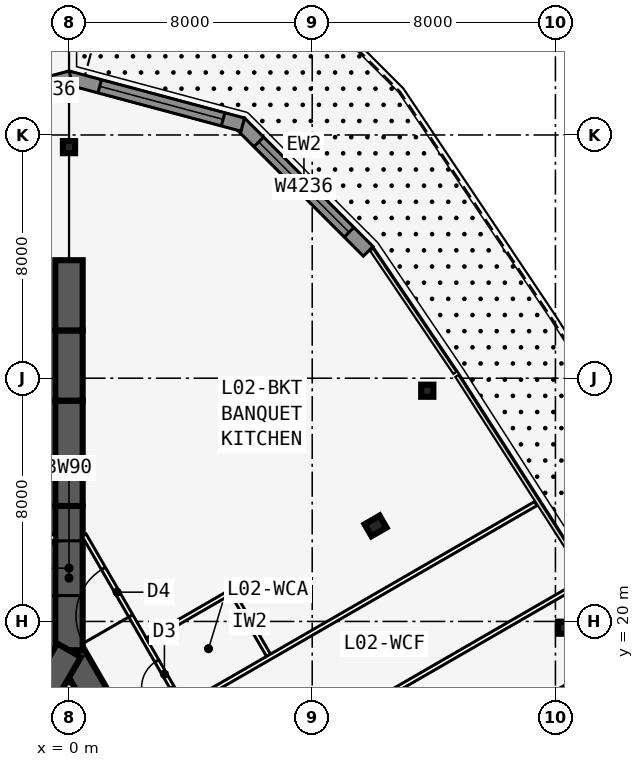
"""IFC4 building model, lengths in metres.
Left out: names, types, materials, properties, quantities, classifications, styles, units other than length and angle.
Written with IfcOpenShell. Run it as: python <this file> out.ifc"""

import sys

from ifc_helpers import new_model, si_unit, direction, frame, frame_2d, origin, origin_2d, place, context, subcontext, project, spatial, rectangle, i_section, extrude, element, fill, save


model = new_model("IFC4")
c1 = context("Model", 3, precision=1e-05, world=origin(), true_north=direction((0.0, 1.0)))
c2 = subcontext(c1, "Body", "Model", "MODEL_VIEW")
j1 = project(units=[si_unit("LENGTHUNIT", "METRE"), si_unit("PLANEANGLEUNIT", "RADIAN")], contexts=[c1])
p1 = place(None, origin())
s1 = spatial("IfcSite", under=j1, at=p1, CompositionType="ELEMENT")
p2 = place(p1, origin())
s2 = spatial("IfcBuilding", under=s1, at=p2, CompositionType="ELEMENT")
p3 = place(p2, frame((0.0, 0.0, 11.0)))
s3 = spatial("IfcBuildingStorey", under=s2, at=p3, CompositionType="ELEMENT", Elevation=11.0)
p4 = place(p3, frame((16.5, -9.526, 0.0), z_axis=(0.0, 0.0, 1.0), x_axis=(-0.499999749417, 0.866025548458, 0.0)))
e1 = element("IfcWall", 1, at=p4, inside=s3, PredefinedType="SHEAR", context=c2, shape_type="SweptSolid", body=[
    extrude(rectangle(XDim=33.0, YDim=0.9, at=frame_2d((16.5, 0.0))), origin(), (0.0, 0.0, 1.0), 6.5),
])
p5 = place(p4, frame((14.15, 0.0, 0.0)))
e2 = element("IfcOpeningElement", 2, at=p5, cuts=e1, PredefinedType="OPENING", context=c2, shape_type="SweptSolid", body=[
    extrude(rectangle(XDim=1.8, YDim=2.13, at=frame_2d((0.9, 1.065))), frame((0.0, 0.46, 0.0), z_axis=(0.0, -1.0, 0.0), x_axis=(1.0, 0.0, 0.0)), (0.0, 0.0, 1.0), 0.92),
])
p6 = place(p4, frame((12.6, 0.0, 0.0)))
e3 = element("IfcOpeningElement", 3, at=p6, cuts=e1, PredefinedType="OPENING", context=c2, shape_type="SweptSolid", body=[
    extrude(rectangle(XDim=1.0, YDim=2.13, at=frame_2d((0.5, 1.065))), frame((0.0, 0.46, 0.0), z_axis=(0.0, -1.0, 0.0), x_axis=(1.0, 0.0, 0.0)), (0.0, 0.0, 1.0), 0.92),
])
p7 = place(p3, frame((0.0, 19.052, 0.0), z_axis=(0.0, 0.0, 1.0), x_axis=(-0.499999749417, -0.866025548458, 0.0)))
e4 = element("IfcWall", 4, at=p7, inside=s3, PredefinedType="SHEAR", context=c2, shape_type="SweptSolid", body=[
    extrude(rectangle(XDim=33.0, YDim=0.9, at=frame_2d((16.5, 0.0))), origin(), (0.0, 0.0, 1.0), 6.5),
])
p8 = place(p7, frame((14.15, 0.0, 0.0)))
e5 = element("IfcOpeningElement", 5, at=p8, cuts=e4, PredefinedType="OPENING", context=c2, shape_type="SweptSolid", body=[
    extrude(rectangle(XDim=1.8, YDim=2.13, at=frame_2d((0.9, 1.065))), frame((0.0, 0.46, 0.0), z_axis=(0.0, -1.0, 0.0), x_axis=(1.0, 0.0, 0.0)), (0.0, 0.0, 1.0), 0.92),
])
p9 = place(p7, frame((12.6, 0.0, 0.0)))
e6 = element("IfcOpeningElement", 6, at=p9, cuts=e4, PredefinedType="OPENING", context=c2, shape_type="SweptSolid", body=[
    extrude(rectangle(XDim=1.0, YDim=2.13, at=frame_2d((0.5, 1.065))), frame((0.0, 0.46, 0.0), z_axis=(0.0, -1.0, 0.0), x_axis=(1.0, 0.0, 0.0)), (0.0, 0.0, 1.0), 0.92),
])
p10 = place(p3, frame((0.0, 19.052, 0.0), z_axis=(0.0, 0.0, 1.0), x_axis=(0.0, 1.0, 0.0)))
e7 = element("IfcWall", 7, at=p10, inside=s3, PredefinedType="SHEAR", context=c2, shape_type="SweptSolid", body=[
    extrude(rectangle(XDim=4.746, YDim=0.9, at=frame_2d((2.373, 0.0))), origin(), (0.0, 0.0, 1.0), 6.5),
])
p11 = place(p10, frame((1.8, 0.0, 0.0)))
e8 = element("IfcOpeningElement", 8, at=p11, cuts=e7, PredefinedType="OPENING", context=c2, shape_type="SweptSolid", body=[
    extrude(rectangle(XDim=1.8, YDim=2.13, at=frame_2d((0.9, 1.065))), frame((0.0, 0.46, 0.0), z_axis=(0.0, -1.0, 0.0), x_axis=(1.0, 0.0, 0.0)), (0.0, 0.0, 1.0), 0.92),
])
p12 = place(p3, frame((0.0, 23.799, 0.0), z_axis=(0.0, 0.0, 1.0), x_axis=(0.0, 1.0, 0.0)))
e9 = element("IfcWall", 9, at=p12, inside=s3, PredefinedType="SHEAR", context=c2, shape_type="SweptSolid", body=[
    extrude(rectangle(XDim=1.155, YDim=0.9, at=frame_2d((0.577, 0.0))), origin(), (0.0, 0.0, 1.0), 6.5),
])
p13 = place(p3, frame((0.0, 24.953, 0.0), z_axis=(0.0, 0.0, 1.0), x_axis=(0.0, 1.0, 0.0)))
e10 = element("IfcWall", 10, at=p13, inside=s3, PredefinedType="SHEAR", context=c2, shape_type="SweptSolid", body=[
    extrude(rectangle(XDim=2.309, YDim=0.9, at=frame_2d((1.155, 0.0))), origin(), (0.0, 0.0, 1.0), 6.5),
])
p14 = place(p3, frame((0.0, 27.263, 0.0), z_axis=(0.0, 0.0, 1.0), x_axis=(0.0, 1.0, 0.0)))
e11 = element("IfcWall", 11, at=p14, inside=s3, PredefinedType="SHEAR", context=c2, shape_type="SweptSolid", body=[
    extrude(rectangle(XDim=2.31, YDim=0.9, at=frame_2d((1.155, 0.0))), origin(), (0.0, 0.0, 1.0), 6.5),
])
p15 = place(p3, frame((0.0, 29.572, 0.0), z_axis=(0.0, 0.0, 1.0), x_axis=(0.0, 1.0, 0.0)))
e12 = element("IfcWall", 12, at=p15, inside=s3, PredefinedType="SHEAR", context=c2, shape_type="SweptSolid", body=[
    extrude(rectangle(XDim=2.309, YDim=0.9, at=frame_2d((1.155, 0.0))), origin(), (0.0, 0.0, 1.0), 6.5),
])
p16 = place(p3, frame((10.083, 23.142, 0.0), z_axis=(0.0, 0.0, 1.0), x_axis=(-0.5, 0.866025403784, 0.0)))
e13 = element("IfcColumn", 13, at=p16, inside=s3, PredefinedType="COLUMN", context=c2, shape_type="SweptSolid", body=[
    extrude(i_section(OverallWidth=0.455, OverallDepth=0.569, WebThickness=0.078, FlangeThickness=0.125, at=origin_2d()), origin(), (0.0, 0.0, 1.0), 6.5),
])
for number, where, z_axis, x_axis in (
    (14, (0.0, 35.6, 0.0), (0.0, 0.0, 1.0), (1.0, 0.0, 0.0)),
    (15, (11.785, 27.588, 0.0), (0.0, 0.0, 1.0), (1.0, 0.0, 0.0)),
    (16, (16.285, 19.794, 0.0), (0.0, 0.0, 1.0), (1.0, 0.0, 0.0)),
):
    element("IfcColumn", number, at=place(p3, frame(where, z_axis=z_axis, x_axis=x_axis)), inside=s3, PredefinedType="COLUMN", context=c2, shape_type="SweptSolid", body=[
        extrude(i_section(OverallWidth=0.401, OverallDepth=0.399, WebThickness=0.025, FlangeThickness=0.04, at=origin_2d()), origin(), (0.0, 0.0, 1.0), 6.5),
    ])
p17 = place(p3, frame((9.841, 32.173, 0.0), z_axis=(0.0, 0.0, 1.0), x_axis=(-0.707106781187, 0.707106781187, 0.0)))
e17 = element("IfcWall", 17, at=p17, inside=s3, PredefinedType="SOLIDWALL", context=c2, shape_type="SweptSolid", body=[
    extrude(rectangle(XDim=5.977, YDim=0.45, at=frame_2d((2.988, 0.0))), origin(), (0.0, 0.0, 1.0), 6.25),
])
p18 = place(p17, frame((0.889, 0.0, 1.2)))
e18 = element("IfcOpeningElement", 18, at=p18, cuts=e17, PredefinedType="OPENING", context=c2, shape_type="SweptSolid", body=[
    extrude(rectangle(XDim=4.2, YDim=3.6, at=frame_2d((2.1, 1.8))), frame((0.0, 0.235, 0.0), z_axis=(0.0, -1.0, 0.0), x_axis=(1.0, 0.0, 0.0)), (0.0, 0.0, 1.0), 0.47),
])
p19 = place(p3, frame((5.715, 36.341, 0.0), z_axis=(0.0, 0.0, 1.0), x_axis=(-0.965930548995, 0.258801419081, 0.0)))
e19 = element("IfcWall", 19, at=p19, inside=s3, PredefinedType="SOLIDWALL", context=c2, shape_type="SweptSolid", body=[
    extrude(rectangle(XDim=5.977, YDim=0.45, at=frame_2d((2.989, 0.0))), origin(), (0.0, 0.0, 1.0), 6.25),
])
p20 = place(p19, frame((0.67, 0.0, 1.2)))
e20 = element("IfcOpeningElement", 20, at=p20, cuts=e19, PredefinedType="OPENING", context=c2, shape_type="SweptSolid", body=[
    extrude(rectangle(XDim=4.2, YDim=3.6, at=frame_2d((2.1, 1.8))), frame((0.0, 0.235, 0.0), z_axis=(0.0, -1.0, 0.0), x_axis=(1.0, 0.0, 0.0)), (0.0, 0.0, 1.0), 0.47),
])
p21 = place(p3, frame((0.058, 37.888, 0.0), z_axis=(0.0, 0.0, 1.0), x_axis=(-0.965930548995, -0.258801419081, 0.0)))
e21 = element("IfcWall", 21, at=p21, inside=s3, PredefinedType="SOLIDWALL", context=c2, shape_type="SweptSolid", body=[
    extrude(rectangle(XDim=5.977, YDim=0.45, at=frame_2d((2.989, 0.0))), origin(), (0.0, 0.0, 1.0), 6.25),
])
p22 = place(p21, frame((2.757, 0.0, 0.0)))
e22 = element("IfcOpeningElement", 22, at=p22, cuts=e21, PredefinedType="OPENING", context=c2, shape_type="SweptSolid", body=[
    extrude(rectangle(XDim=0.9, YDim=2.13, at=frame_2d((0.45, 1.065))), frame((0.0, 0.235, 0.0), z_axis=(0.0, -1.0, 0.0), x_axis=(1.0, 0.0, 0.0)), (0.0, 0.0, 1.0), 0.47),
])
p23 = place(p21, frame((0.997, 0.0, 1.2)))
e23 = element("IfcOpeningElement", 23, at=p23, cuts=e21, PredefinedType="OPENING", context=c2, shape_type="SweptSolid", body=[
    extrude(rectangle(XDim=1.2, YDim=3.6, at=frame_2d((0.6, 1.8))), frame((0.0, 0.235, 0.0), z_axis=(0.0, -1.0, 0.0), x_axis=(1.0, 0.0, 0.0)), (0.0, 0.0, 1.0), 0.47),
])
p24 = place(p21, frame((4.217, 0.0, 1.2)))
e24 = element("IfcOpeningElement", 24, at=p24, cuts=e21, PredefinedType="OPENING", context=c2, shape_type="SweptSolid", body=[
    extrude(rectangle(XDim=1.2, YDim=3.6, at=frame_2d((0.6, 1.8))), frame((0.0, 0.235, 0.0), z_axis=(0.0, -1.0, 0.0), x_axis=(1.0, 0.0, 0.0)), (0.0, 0.0, 1.0), 0.47),
])
p25 = place(p3, frame((20.027, -10.985, 0.0), z_axis=(0.0, 0.0, 1.0), x_axis=(-0.500001677587, 0.866024435227, 0.0)))
e25 = element("IfcWall", 25, at=p25, inside=s3, PredefinedType="PARTITIONING", context=c2, shape_type="SweptSolid", body=[
    extrude(rectangle(XDim=39.054, YDim=0.15, at=frame_2d((19.527, 0.0))), origin(), (0.0, 0.0, 1.0), 5.308),
])
p26 = place(p25, frame((10.013, 0.0, 0.0)))
e26 = element("IfcOpeningElement", 26, at=p26, cuts=e25, PredefinedType="OPENING", context=c2, shape_type="SweptSolid", body=[
    extrude(rectangle(XDim=1.8, YDim=2.13, at=frame_2d((0.9, 1.065))), frame((0.0, 0.085, 0.0), z_axis=(0.0, -1.0, 0.0), x_axis=(1.0, 0.0, 0.0)), (0.0, 0.0, 1.0), 0.17),
])
p27 = place(p25, frame((23.227, 0.0, 0.0)))
e27 = element("IfcOpeningElement", 27, at=p27, cuts=e25, PredefinedType="OPENING", context=c2, shape_type="SweptSolid", body=[
    extrude(rectangle(XDim=1.8, YDim=2.13, at=frame_2d((0.9, 1.065))), frame((0.0, 0.085, 0.0), z_axis=(0.0, -1.0, 0.0), x_axis=(1.0, 0.0, 0.0)), (0.0, 0.0, 1.0), 0.17),
])
p28 = place(p25, frame((27.627, 0.0, 0.0)))
e28 = element("IfcOpeningElement", 28, at=p28, cuts=e25, PredefinedType="OPENING", context=c2, shape_type="SweptSolid", body=[
    extrude(rectangle(XDim=1.0, YDim=2.13, at=frame_2d((0.5, 1.065))), frame((0.0, 0.085, 0.0), z_axis=(0.0, -1.0, 0.0), x_axis=(1.0, 0.0, 0.0)), (0.0, 0.0, 1.0), 0.17),
])
p29 = place(p25, frame((30.527, 0.0, 0.0)))
e29 = element("IfcOpeningElement", 29, at=p29, cuts=e25, PredefinedType="OPENING", context=c2, shape_type="SweptSolid", body=[
    extrude(rectangle(XDim=1.0, YDim=2.13, at=frame_2d((0.5, 1.065))), frame((0.0, 0.085, 0.0), z_axis=(0.0, -1.0, 0.0), x_axis=(1.0, 0.0, 0.0)), (0.0, 0.0, 1.0), 0.17),
])
p30 = place(p25, frame((33.277, 0.0, 0.0)))
e30 = element("IfcOpeningElement", 30, at=p30, cuts=e25, PredefinedType="OPENING", context=c2, shape_type="SweptSolid", body=[
    extrude(rectangle(XDim=1.0, YDim=2.13, at=frame_2d((0.5, 1.065))), frame((0.0, 0.085, 0.0), z_axis=(0.0, -1.0, 0.0), x_axis=(1.0, 0.0, 0.0)), (0.0, 0.0, 1.0), 0.17),
])
p31 = place(p25, frame((35.99, 0.0, 0.0)))
e31 = element("IfcOpeningElement", 31, at=p31, cuts=e25, PredefinedType="OPENING", context=c2, shape_type="SweptSolid", body=[
    extrude(rectangle(XDim=1.8, YDim=2.13, at=frame_2d((0.9, 1.065))), frame((0.0, 0.085, 0.0), z_axis=(0.0, -1.0, 0.0), x_axis=(1.0, 0.0, 0.0)), (0.0, 0.0, 1.0), 0.17),
])
p32 = place(p3, frame((6.729, 12.198, 0.0), z_axis=(0.0, 0.0, 1.0), x_axis=(0.866022969634, 0.500004216049, 0.0)))
e32 = element("IfcWall", 32, at=p32, inside=s3, PredefinedType="SHEAR", context=c2, shape_type="SweptSolid", body=[
    extrude(rectangle(XDim=13.526, YDim=0.2, at=frame_2d((6.763, 0.0))), origin(), (0.0, 0.0, 1.0), 6.5),
])
p33 = place(p3, frame((5.329, 14.623, 0.0), z_axis=(0.0, 0.0, 1.0), x_axis=(0.866024753221, 0.500001126807, 0.0)))
e33 = element("IfcWall", 33, at=p33, inside=s3, PredefinedType="PARTITIONING", context=c2, shape_type="SweptSolid", body=[
    extrude(rectangle(XDim=13.448, YDim=0.15, at=frame_2d((6.724, 0.0))), origin(), (0.0, 0.0, 1.0), 5.308),
])
p34 = place(p3, frame((3.829, 17.221, 0.0), z_axis=(0.0, 0.0, 1.0), x_axis=(0.866019382877, 0.500010428373, 0.0)))
e34 = element("IfcWall", 34, at=p34, inside=s3, PredefinedType="PARTITIONING", context=c2, shape_type="SweptSolid", body=[
    extrude(rectangle(XDim=13.307, YDim=0.15, at=frame_2d((6.654, 0.0))), origin(), (0.0, 0.0, 1.0), 6.25),
])
p35 = place(p3, frame((6.562, 18.886, 0.0), z_axis=(0.0, 0.0, 1.0), x_axis=(-0.500004234368, 0.866022959057, 0.0)))
e35 = element("IfcWall", 35, at=p35, inside=s3, PredefinedType="PARTITIONING", context=c2, shape_type="SweptSolid", body=[
    extrude(rectangle(XDim=2.5, YDim=0.15, at=frame_2d((1.25, 0.0))), origin(), (0.0, 0.0, 1.0), 6.25),
])
p36 = place(p3, frame((2.579, 19.386, 0.0), z_axis=(0.0, 0.0, 1.0), x_axis=(0.866022959057, 0.500004234368, 0.0)))
e36 = element("IfcWall", 36, at=p36, inside=s3, PredefinedType="PARTITIONING", context=c2, shape_type="SweptSolid", body=[
    extrude(rectangle(XDim=3.125, YDim=0.15, at=frame_2d((1.562, 0.0))), origin(), (0.0, 0.0, 1.0), 6.25),
])
p37 = place(p3, frame((-0.5, 22.836, 0.0), z_axis=(0.0, 0.0, 1.0), x_axis=(-0.500001677587, -0.866024435227, 0.0)))
e37 = element("IfcWall", 37, at=p37, inside=s3, PredefinedType="PARTITIONING", context=c2, shape_type="SweptSolid", body=[
    extrude(rectangle(XDim=39.054, YDim=0.15, at=frame_2d((19.527, 0.0))), origin(), (0.0, 0.0, 1.0), 5.308),
])
p38 = place(p37, frame((10.013, 0.0, 0.0)))
e38 = element("IfcOpeningElement", 38, at=p38, cuts=e37, PredefinedType="OPENING", context=c2, shape_type="SweptSolid", body=[
    extrude(rectangle(XDim=1.8, YDim=2.13, at=frame_2d((0.9, 1.065))), frame((0.0, 0.085, 0.0), z_axis=(0.0, -1.0, 0.0), x_axis=(1.0, 0.0, 0.0)), (0.0, 0.0, 1.0), 0.17),
])
p39 = place(p37, frame((23.227, 0.0, 0.0)))
e39 = element("IfcOpeningElement", 39, at=p39, cuts=e37, PredefinedType="OPENING", context=c2, shape_type="SweptSolid", body=[
    extrude(rectangle(XDim=1.8, YDim=2.13, at=frame_2d((0.9, 1.065))), frame((0.0, 0.085, 0.0), z_axis=(0.0, -1.0, 0.0), x_axis=(1.0, 0.0, 0.0)), (0.0, 0.0, 1.0), 0.17),
])
p40 = place(p37, frame((27.627, 0.0, 0.0)))
e40 = element("IfcOpeningElement", 40, at=p40, cuts=e37, PredefinedType="OPENING", context=c2, shape_type="SweptSolid", body=[
    extrude(rectangle(XDim=1.0, YDim=2.13, at=frame_2d((0.5, 1.065))), frame((0.0, 0.085, 0.0), z_axis=(0.0, -1.0, 0.0), x_axis=(1.0, 0.0, 0.0)), (0.0, 0.0, 1.0), 0.17),
])
p41 = place(p37, frame((30.277, 0.0, 0.0)))
e41 = element("IfcOpeningElement", 41, at=p41, cuts=e37, PredefinedType="OPENING", context=c2, shape_type="SweptSolid", body=[
    extrude(rectangle(XDim=1.0, YDim=2.13, at=frame_2d((0.5, 1.065))), frame((0.0, 0.085, 0.0), z_axis=(0.0, -1.0, 0.0), x_axis=(1.0, 0.0, 0.0)), (0.0, 0.0, 1.0), 0.17),
])
p42 = place(p37, frame((34.89, 0.0, 0.0)))
e42 = element("IfcOpeningElement", 42, at=p42, cuts=e37, PredefinedType="OPENING", context=c2, shape_type="SweptSolid", body=[
    extrude(rectangle(XDim=1.0, YDim=2.13, at=frame_2d((0.5, 1.065))), frame((0.0, 0.085, 0.0), z_axis=(0.0, -1.0, 0.0), x_axis=(1.0, 0.0, 0.0)), (0.0, 0.0, 1.0), 0.17),
])
p43 = place(p18, origin())
e43 = element("IfcWindow", 43, at=p43, inside=s3, PartitioningType="SINGLE_PANEL", PredefinedType="WINDOW", context=c2, shape_type="SweptSolid", body=[
    extrude(rectangle(XDim=4.2, YDim=3.6, at=frame_2d((2.1, 1.8))), frame((0.0, 0.03, 0.0), z_axis=(0.0, -1.0, 0.0), x_axis=(1.0, 0.0, 0.0)), (0.0, 0.0, 1.0), 0.06),
])
fill(e18, e43)
p44 = place(p20, origin())
e44 = element("IfcWindow", 44, at=p44, inside=s3, PartitioningType="SINGLE_PANEL", PredefinedType="WINDOW", context=c2, shape_type="SweptSolid", body=[
    extrude(rectangle(XDim=4.2, YDim=3.6, at=frame_2d((2.1, 1.8))), frame((0.0, 0.03, 0.0), z_axis=(0.0, -1.0, 0.0), x_axis=(1.0, 0.0, 0.0)), (0.0, 0.0, 1.0), 0.06),
])
fill(e20, e44)
p45 = place(p30, origin())
e45 = element("IfcDoor", 45, at=p45, inside=s3, OperationType="SINGLE_SWING_LEFT", PredefinedType="DOOR", context=c2, shape_type="SweptSolid", body=[
    extrude(rectangle(XDim=1.0, YDim=2.13, at=frame_2d((0.5, 1.065))), frame((0.0, 0.025, 0.0), z_axis=(0.0, -1.0, 0.0), x_axis=(1.0, 0.0, 0.0)), (0.0, 0.0, 1.0), 0.05),
])
fill(e30, e45)
p46 = place(p31, origin())
e46 = element("IfcDoor", 46, at=p46, inside=s3, OperationType="DOUBLE_DOOR_SINGLE_SWING", PredefinedType="DOOR", context=c2, shape_type="SweptSolid", body=[
    extrude(rectangle(XDim=1.8, YDim=2.13, at=frame_2d((0.9, 1.065))), frame((0.0, 0.025, 0.0), z_axis=(0.0, -1.0, 0.0), x_axis=(1.0, 0.0, 0.0)), (0.0, 0.0, 1.0), 0.05),
])
fill(e31, e46)
p47 = place(p11, origin())
e47 = element("IfcDoor", 47, at=p47, inside=s3, OperationType="DOUBLE_DOOR_DOUBLE_SWING", PredefinedType="DOOR", context=c2, shape_type="SweptSolid", body=[
    extrude(rectangle(XDim=1.8, YDim=2.13, at=frame_2d((0.9, 1.065))), frame((0.0, 0.025, 0.0), z_axis=(0.0, -1.0, 0.0), x_axis=(1.0, 0.0, 0.0)), (0.0, 0.0, 1.0), 0.05),
])
fill(e8, e47)
save(model, sys.argv[1])
